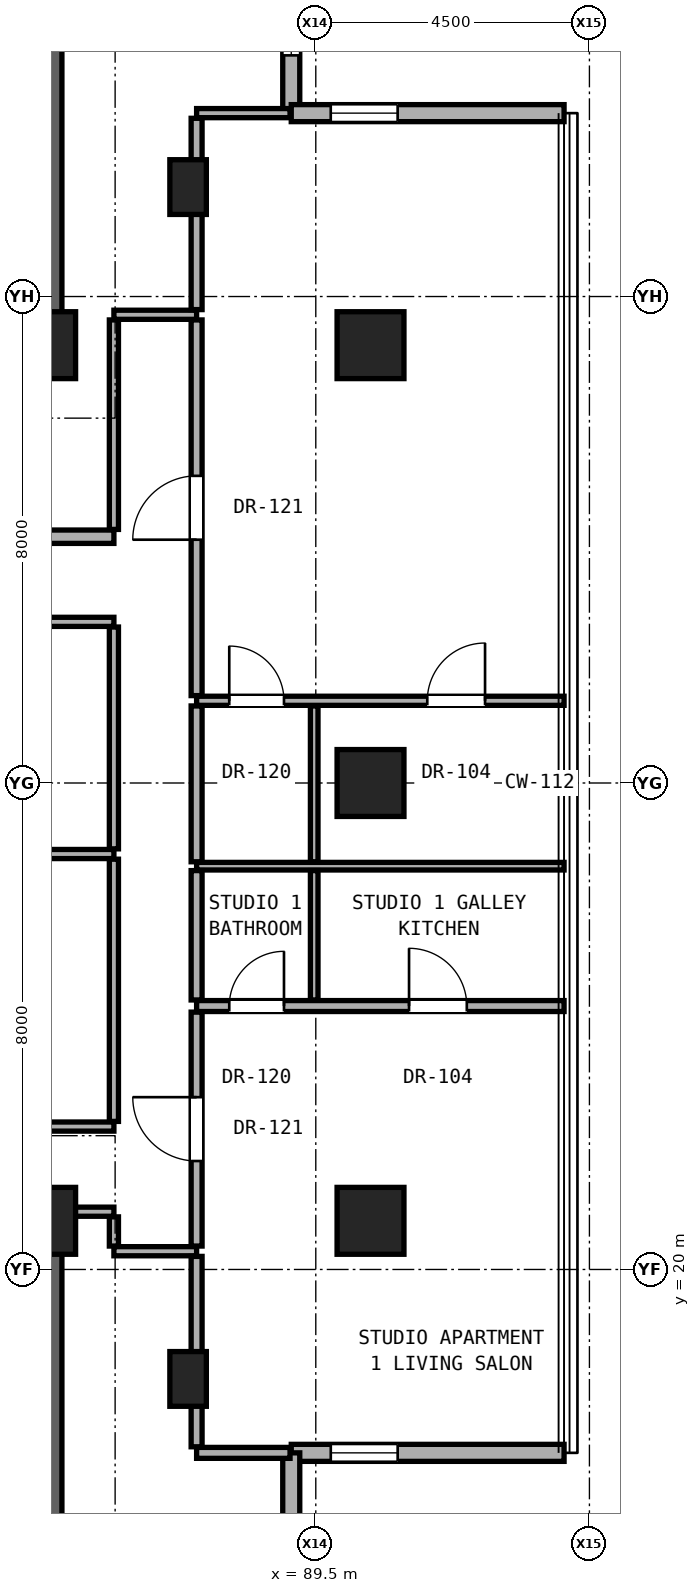
"""IFC4 building model, lengths in metres.
Left out: names, types, materials, properties, quantities, classifications, styles, units other than length and angle.
Written with IfcOpenShell. Run it as: python <this file> out.ifc"""

import sys

from ifc_helpers import new_model, si_unit, direction, frame, frame_2d, origin, origin_2d, place, context, subcontext, project, spatial, rectangle, hollow_rectangle, extrude, element, fill, save


model = new_model("IFC4")
c1 = context("Model", 3, precision=1e-05, world=origin(), true_north=direction((0.0, 1.0)))
c2 = subcontext(c1, "Body", "Model", "MODEL_VIEW")
j1 = project(units=[si_unit("LENGTHUNIT", "METRE"), si_unit("PLANEANGLEUNIT", "RADIAN")], contexts=[c1])
p1 = place(None, origin())
s1 = spatial("IfcSite", under=j1, at=p1, CompositionType="ELEMENT")
p2 = place(p1, origin())
s2 = spatial("IfcBuilding", under=s1, at=p2, CompositionType="ELEMENT")
p3 = place(p2, frame((0.0, 0.0, 121.4)))
s3 = spatial("IfcBuildingStorey", under=s2, at=p3, CompositionType="ELEMENT", Elevation=121.4)
for number, where, z_axis, x_axis in (
    (1, (85.0, 20.8, 0.0), (0.0, 0.0, 1.0), (1.0, 0.0, 0.0)),
    (2, (85.0, 35.2, 0.0), (0.0, 0.0, 1.0), (1.0, 0.0, 0.0)),
):
    element("IfcColumn", number, at=place(p3, frame(where, z_axis=z_axis, x_axis=x_axis)), inside=s3, PredefinedType="COLUMN", context=c2, shape_type="SweptSolid", body=[
        extrude(rectangle(XDim=1.1, YDim=1.1, at=origin_2d()), origin(), (0.0, 0.0, 1.0), 3.3),
    ])
for number, where, z_axis, x_axis in (
    (3, (90.4, 20.8, 0.0), (0.0, 0.0, 1.0), (1.0, 0.0, 0.0)),
    (4, (90.4, 28.0, 0.0), (0.0, 0.0, 1.0), (1.0, 0.0, 0.0)),
    (5, (90.4, 35.2, 0.0), (0.0, 0.0, 1.0), (1.0, 0.0, 0.0)),
):
    element("IfcColumn", number, at=place(p3, frame(where, z_axis=z_axis, x_axis=x_axis)), inside=s3, PredefinedType="COLUMN", context=c2, shape_type="SweptSolid", body=[
        extrude(hollow_rectangle(XDim=1.1, YDim=1.1, WallThickness=0.06, at=origin_2d()), origin(), (0.0, 0.0, 1.0), 3.3),
    ])
for number, where, z_axis, x_axis in (
    (6, (87.4, 18.2, 0.0), (0.0, 0.0, 1.0), (1.0, 0.0, 0.0)),
    (7, (87.4, 37.8, 0.0), (0.0, 0.0, 1.0), (1.0, 0.0, 0.0)),
):
    element("IfcColumn", number, at=place(p3, frame(where, z_axis=z_axis, x_axis=x_axis)), inside=s3, PredefinedType="PILASTER", context=c2, shape_type="SweptSolid", body=[
        extrude(rectangle(XDim=0.6, YDim=0.9, at=origin_2d()), origin(), (0.0, 0.0, 1.0), 3.3),
    ])
for number, where, z_axis, x_axis in (
    (8, (85.0, 35.2, 0.0), (0.0, 0.0, 1.0), (0.0, 1.0, 0.0)),
    (9, (85.0, 15.2, 0.0), (0.0, 0.0, 1.0), (0.0, 1.0, 0.0)),
):
    element("IfcWall", number, at=place(p3, frame(where, z_axis=z_axis, x_axis=x_axis)), inside=s3, PredefinedType="SHEAR", context=c2, shape_type="SweptSolid", body=[
        extrude(rectangle(XDim=5.6, YDim=0.65, at=frame_2d((2.8, 0.0))), origin(), (0.0, 0.0, 1.0), 3.08),
    ])
p4 = place(p3, frame((89.096, 39.016, 0.0), z_axis=(0.0, 0.0, 1.0), x_axis=(0.0, 1.0, 0.0)))
e10 = element("IfcWall", 10, at=p4, inside=s3, PredefinedType="SOLIDWALL", context=c2, shape_type="SweptSolid", body=[
    extrude(rectangle(XDim=4.486, YDim=0.28, at=frame_2d((2.243, 0.0))), origin(), (0.0, 0.0, 1.0), 3.06),
])
p5 = place(p4, frame((0.95, 0.0, 0.85)))
e11 = element("IfcOpeningElement", 11, at=p5, cuts=e10, PredefinedType="OPENING", context=c2, shape_type="SweptSolid", body=[
    extrude(rectangle(XDim=1.1, YDim=2.0, at=frame_2d((0.55, 1.0))), frame((0.0, 0.15, 0.0), z_axis=(0.0, -1.0, 0.0), x_axis=(1.0, 0.0, 0.0)), (0.0, 0.0, 1.0), 0.3),
])
p6 = place(p3, frame((89.096, 16.984, 0.0), z_axis=(0.0, 0.0, 1.0), x_axis=(1.0, 0.0, 0.0)))
e12 = element("IfcWall", 12, at=p6, inside=s3, PredefinedType="SOLIDWALL", context=c2, shape_type="SweptSolid", body=[
    extrude(rectangle(XDim=4.487, YDim=0.28, at=frame_2d((2.243, 0.0))), origin(), (0.0, 0.0, 1.0), 3.06),
])
p7 = place(p6, frame((0.65, 0.0, 0.85)))
e13 = element("IfcOpeningElement", 13, at=p7, cuts=e12, PredefinedType="OPENING", context=c2, shape_type="SweptSolid", body=[
    extrude(rectangle(XDim=1.1, YDim=2.0, at=frame_2d((0.55, 1.0))), frame((0.0, 0.15, 0.0), z_axis=(0.0, -1.0, 0.0), x_axis=(1.0, 0.0, 0.0)), (0.0, 0.0, 1.0), 0.3),
])
p8 = place(p3, frame((89.096, 12.498, 0.0), z_axis=(0.0, 0.0, 1.0), x_axis=(0.0, 1.0, 0.0)))
e14 = element("IfcWall", 14, at=p8, inside=s3, PredefinedType="SOLIDWALL", context=c2, shape_type="SweptSolid", body=[
    extrude(rectangle(XDim=4.486, YDim=0.28, at=frame_2d((2.243, 0.0))), origin(), (0.0, 0.0, 1.0), 3.06),
])
p9 = place(p3, frame((93.583, 39.016, 0.0), z_axis=(0.0, 0.0, 1.0), x_axis=(-1.0, 0.0, 0.0)))
e15 = element("IfcWall", 15, at=p9, inside=s3, PredefinedType="SOLIDWALL", context=c2, shape_type="SweptSolid", body=[
    extrude(rectangle(XDim=4.487, YDim=0.28, at=frame_2d((2.243, 0.0))), origin(), (0.0, 0.0, 1.0), 3.06),
])
p10 = place(p9, frame((2.737, 0.0, 0.85)))
e16 = element("IfcOpeningElement", 16, at=p10, cuts=e15, PredefinedType="OPENING", context=c2, shape_type="SweptSolid", body=[
    extrude(rectangle(XDim=1.1, YDim=2.0, at=frame_2d((0.55, 1.0))), frame((0.0, 0.15, 0.0), z_axis=(0.0, -1.0, 0.0), x_axis=(1.0, 0.0, 0.0)), (0.0, 0.0, 1.0), 0.3),
])
p11 = place(p3, frame((87.54, 16.984, 0.0), z_axis=(0.0, 0.0, 1.0), x_axis=(1.0, 0.0, 0.0)))
e17 = element("IfcWall", 17, at=p11, inside=s3, PredefinedType="PARTITIONING", context=c2, shape_type="SweptSolid", body=[
    extrude(rectangle(XDim=1.536, YDim=0.18, at=frame_2d((0.768, 0.0))), origin(), (0.0, 0.0, 1.0), 3.08),
])
p12 = place(p3, frame((86.18, 20.3, 0.0), z_axis=(0.0, 0.0, 1.0), x_axis=(1.0, 0.0, 0.0)))
e18 = element("IfcWall", 18, at=p12, inside=s3, PredefinedType="PARTITIONING", context=c2, shape_type="SweptSolid", body=[
    extrude(rectangle(XDim=1.36, YDim=0.15, at=frame_2d((0.68, 0.0))), origin(), (0.0, 0.0, 1.0), 3.08),
])
p13 = place(p3, frame((85.32, 20.95, 0.0), z_axis=(0.0, 0.0, 1.0), x_axis=(1.0, 0.0, 0.0)))
e19 = element("IfcWall", 19, at=p13, inside=s3, PredefinedType="PARTITIONING", context=c2, shape_type="SweptSolid", body=[
    extrude(rectangle(XDim=0.86, YDim=0.15, at=frame_2d((0.43, 0.0))), origin(), (0.0, 0.0, 1.0), 2.472),
])
p14 = place(p3, frame((66.68, 22.35, 0.0), z_axis=(0.0, 0.0, 1.0), x_axis=(1.0, 0.0, 0.0)))
e20 = element("IfcWall", 20, at=p14, inside=s3, PredefinedType="PARTITIONING", context=c2, shape_type="SweptSolid", body=[
    extrude(rectangle(XDim=19.5, YDim=0.15, at=frame_2d((9.75, 0.0))), origin(), (0.0, 0.0, 1.0), 2.216),
])
p15 = place(p14, frame((11.89, 0.0, 0.0)))
e21 = element("IfcOpeningElement", 21, at=p15, cuts=e20, PredefinedType="OPENING", context=c2, shape_type="SweptSolid", body=[
    extrude(rectangle(XDim=1.05, YDim=2.2, at=frame_2d((0.525, 1.1))), frame((0.0, 0.085, 0.0), z_axis=(0.0, -1.0, 0.0), x_axis=(1.0, 0.0, 0.0)), (0.0, 0.0, 1.0), 0.17),
])
p16 = place(p3, frame((87.54, 24.332, 0.0), z_axis=(0.0, 0.0, 1.0), x_axis=(1.0, 0.0, 0.0)))
e22 = element("IfcWall", 22, at=p16, inside=s3, PredefinedType="PARTITIONING", context=c2, shape_type="SweptSolid", body=[
    extrude(rectangle(XDim=6.043, YDim=0.18, at=frame_2d((3.021, 0.0))), origin(), (0.0, 0.0, 1.0), 2.299),
])
p17 = place(p16, frame((3.493, 0.0, 0.0)))
e23 = element("IfcOpeningElement", 23, at=p17, cuts=e22, PredefinedType="OPENING", context=c2, shape_type="SweptSolid", body=[
    extrude(rectangle(XDim=0.95, YDim=2.15, at=frame_2d((0.475, 1.075))), frame((0.0, 0.1, 0.0), z_axis=(0.0, -1.0, 0.0), x_axis=(1.0, 0.0, 0.0)), (0.0, 0.0, 1.0), 0.2),
])
p18 = place(p16, frame((0.537, 0.0, 0.0)))
e24 = element("IfcOpeningElement", 24, at=p18, cuts=e22, PredefinedType="OPENING", context=c2, shape_type="SweptSolid", body=[
    extrude(rectangle(XDim=0.9, YDim=2.1, at=frame_2d((0.45, 1.05))), frame((0.0, 0.1, 0.0), z_axis=(0.0, -1.0, 0.0), x_axis=(1.0, 0.0, 0.0)), (0.0, 0.0, 1.0), 0.2),
])
p19 = place(p3, frame((87.54, 26.632, 0.0), z_axis=(0.0, 0.0, 1.0), x_axis=(1.0, 0.0, 0.0)))
e25 = element("IfcWall", 25, at=p19, inside=s3, PredefinedType="PARTITIONING", context=c2, shape_type="SweptSolid", body=[
    extrude(rectangle(XDim=6.043, YDim=0.125, at=frame_2d((3.021, 0.0))), origin(), (0.0, 0.0, 1.0), 2.299),
])
p20 = place(p3, frame((72.05, 26.832, 0.0), z_axis=(0.0, 0.0, 1.0), x_axis=(1.0, 0.0, 0.0)))
e26 = element("IfcWall", 26, at=p20, inside=s3, PredefinedType="PARTITIONING", context=c2, shape_type="SweptSolid", body=[
    extrude(rectangle(XDim=14.13, YDim=0.15, at=frame_2d((7.065, 0.0))), origin(), (0.0, 0.0, 1.0), 2.216),
])
p21 = place(p3, frame((87.54, 29.352, 0.0), z_axis=(0.0, 0.0, 1.0), x_axis=(1.0, 0.0, 0.0)))
e27 = element("IfcWall", 27, at=p21, inside=s3, PredefinedType="PARTITIONING", context=c2, shape_type="SweptSolid", body=[
    extrude(rectangle(XDim=6.043, YDim=0.15, at=frame_2d((3.021, 0.0))), origin(), (0.0, 0.0, 1.0), 2.299),
])
p22 = place(p21, frame((3.793, 0.0, 0.0)))
e28 = element("IfcOpeningElement", 28, at=p22, cuts=e27, PredefinedType="OPENING", context=c2, shape_type="SweptSolid", body=[
    extrude(rectangle(XDim=0.95, YDim=2.15, at=frame_2d((0.475, 1.075))), frame((0.0, 0.085, 0.0), z_axis=(0.0, -1.0, 0.0), x_axis=(1.0, 0.0, 0.0)), (0.0, 0.0, 1.0), 0.17),
])
p23 = place(p21, frame((0.537, 0.0, 0.0)))
e29 = element("IfcOpeningElement", 29, at=p23, cuts=e27, PredefinedType="OPENING", context=c2, shape_type="SweptSolid", body=[
    extrude(rectangle(XDim=0.9, YDim=2.1, at=frame_2d((0.45, 1.05))), frame((0.0, 0.085, 0.0), z_axis=(0.0, -1.0, 0.0), x_axis=(1.0, 0.0, 0.0)), (0.0, 0.0, 1.0), 0.17),
])
p24 = place(p3, frame((66.68, 30.65, 0.0), z_axis=(0.0, 0.0, 1.0), x_axis=(1.0, 0.0, 0.0)))
e30 = element("IfcWall", 30, at=p24, inside=s3, PredefinedType="PARTITIONING", context=c2, shape_type="SweptSolid", body=[
    extrude(rectangle(XDim=19.5, YDim=0.15, at=frame_2d((9.75, 0.0))), origin(), (0.0, 0.0, 1.0), 2.216),
])
p25 = place(p24, frame((3.745, 0.0, 0.0)))
e31 = element("IfcOpeningElement", 31, at=p25, cuts=e30, PredefinedType="OPENING", context=c2, shape_type="SweptSolid", body=[
    extrude(rectangle(XDim=0.95, YDim=2.15, at=frame_2d((0.475, 1.075))), frame((0.0, 0.085, 0.0), z_axis=(0.0, -1.0, 0.0), x_axis=(1.0, 0.0, 0.0)), (0.0, 0.0, 1.0), 0.17),
])
p26 = place(p24, frame((11.89, 0.0, 0.0)))
e32 = element("IfcOpeningElement", 32, at=p26, cuts=e30, PredefinedType="OPENING", context=c2, shape_type="SweptSolid", body=[
    extrude(rectangle(XDim=1.05, YDim=2.2, at=frame_2d((0.525, 1.1))), frame((0.0, 0.085, 0.0), z_axis=(0.0, -1.0, 0.0), x_axis=(1.0, 0.0, 0.0)), (0.0, 0.0, 1.0), 0.17),
])
p27 = place(p3, frame((71.55, 32.05, 0.0), z_axis=(0.0, 0.0, 1.0), x_axis=(1.0, 0.0, 0.0)))
e33 = element("IfcWall", 33, at=p27, inside=s3, PredefinedType="SOLIDWALL", context=c2, shape_type="SweptSolid", body=[
    extrude(rectangle(XDim=14.63, YDim=0.22, at=frame_2d((7.315, 0.0))), origin(), (0.0, 0.0, 1.0), 2.216),
])
p28 = place(p27, frame((6.065, 0.0, 0.0)))
e34 = element("IfcOpeningElement", 34, at=p28, cuts=e33, PredefinedType="OPENING", context=c2, shape_type="SweptSolid", body=[
    extrude(rectangle(XDim=0.85, YDim=2.01, at=frame_2d((0.425, 1.005))), frame((0.0, 0.12, 0.0), z_axis=(0.0, -1.0, 0.0), x_axis=(1.0, 0.0, 0.0)), (0.0, 0.0, 1.0), 0.24),
])
p29 = place(p27, frame((10.535, 0.0, 0.0)))
e35 = element("IfcOpeningElement", 35, at=p29, cuts=e33, PredefinedType="OPENING", context=c2, shape_type="SweptSolid", body=[
    extrude(rectangle(XDim=0.95, YDim=2.15, at=frame_2d((0.475, 1.075))), frame((0.0, 0.12, 0.0), z_axis=(0.0, -1.0, 0.0), x_axis=(1.0, 0.0, 0.0)), (0.0, 0.0, 1.0), 0.24),
])
p30 = place(p27, frame((1.65, 0.0, 0.0)))
e36 = element("IfcOpeningElement", 36, at=p30, cuts=e33, PredefinedType="OPENING", context=c2, shape_type="SweptSolid", body=[
    extrude(rectangle(XDim=0.85, YDim=2.01, at=frame_2d((0.425, 1.005))), frame((0.0, 0.12, 0.0), z_axis=(0.0, -1.0, 0.0), x_axis=(1.0, 0.0, 0.0)), (0.0, 0.0, 1.0), 0.24),
])
p31 = place(p3, frame((86.18, 35.7, 0.0), z_axis=(0.0, 0.0, 1.0), x_axis=(1.0, 0.0, 0.0)))
e37 = element("IfcWall", 37, at=p31, inside=s3, PredefinedType="PARTITIONING", context=c2, shape_type="SweptSolid", body=[
    extrude(rectangle(XDim=1.36, YDim=0.15, at=frame_2d((0.68, 0.0))), origin(), (0.0, 0.0, 1.0), 3.08),
])
p32 = place(p3, frame((87.54, 39.016, 0.0), z_axis=(0.0, 0.0, 1.0), x_axis=(1.0, 0.0, 0.0)))
e38 = element("IfcWall", 38, at=p32, inside=s3, PredefinedType="PARTITIONING", context=c2, shape_type="SweptSolid", body=[
    extrude(rectangle(XDim=1.536, YDim=0.15, at=frame_2d((0.768, 0.0))), origin(), (0.0, 0.0, 1.0), 3.08),
])
p33 = place(p3, frame((86.18, 20.385, 0.0), z_axis=(0.0, 0.0, 1.0), x_axis=(0.0, 1.0, 0.0)))
e39 = element("IfcWall", 39, at=p33, inside=s3, PredefinedType="PARTITIONING", context=c2, shape_type="SweptSolid", body=[
    extrude(rectangle(XDim=0.48, YDim=0.15, at=frame_2d((0.24, 0.0))), origin(), (0.0, 0.0, 1.0), 2.472),
])
p34 = place(p3, frame((86.18, 22.435, 0.0), z_axis=(0.0, 0.0, 1.0), x_axis=(0.0, 1.0, 0.0)))
e40 = element("IfcWall", 40, at=p34, inside=s3, PredefinedType="PARTITIONING", context=c2, shape_type="SweptSolid", body=[
    extrude(rectangle(XDim=4.312, YDim=0.15, at=frame_2d((2.156, 0.0))), origin(), (0.0, 0.0, 1.0), 3.08),
])
p35 = place(p3, frame((86.18, 26.917, 0.0), z_axis=(0.0, 0.0, 1.0), x_axis=(0.0, 1.0, 0.0)))
e41 = element("IfcWall", 41, at=p35, inside=s3, PredefinedType="PARTITIONING", context=c2, shape_type="SweptSolid", body=[
    extrude(rectangle(XDim=3.648, YDim=0.15, at=frame_2d((1.824, 0.0))), origin(), (0.0, 0.0, 1.0), 2.376),
])
p36 = place(p3, frame((86.18, 32.17, 0.0), z_axis=(0.0, 0.0, 1.0), x_axis=(0.0, 1.0, 0.0)))
e42 = element("IfcWall", 42, at=p36, inside=s3, PredefinedType="PARTITIONING", context=c2, shape_type="SweptSolid", body=[
    extrude(rectangle(XDim=3.445, YDim=0.15, at=frame_2d((1.723, 0.0))), origin(), (0.0, 0.0, 1.0), 2.472),
])
p37 = place(p3, frame((87.54, 17.084, 0.0), z_axis=(0.0, 0.0, 1.0), x_axis=(0.0, 1.0, 0.0)))
e43 = element("IfcWall", 43, at=p37, inside=s3, PredefinedType="PARTITIONING", context=c2, shape_type="SweptSolid", body=[
    extrude(rectangle(XDim=3.131, YDim=0.18, at=frame_2d((1.565, 0.0))), origin(), (0.0, 0.0, 1.0), 2.523),
])
p38 = place(p3, frame((87.54, 20.385, 0.0), z_axis=(0.0, 0.0, 1.0), x_axis=(0.0, 1.0, 0.0)))
e44 = element("IfcWall", 44, at=p38, inside=s3, PredefinedType="PARTITIONING", context=c2, shape_type="SweptSolid", body=[
    extrude(rectangle(XDim=3.847, YDim=0.18, at=frame_2d((1.923, 0.0))), origin(), (0.0, 0.0, 1.0), 2.472),
])
p39 = place(p38, frame((1.398, 0.0, 0.0)))
e45 = element("IfcOpeningElement", 45, at=p39, cuts=e44, PredefinedType="OPENING", context=c2, shape_type="SweptSolid", body=[
    extrude(rectangle(XDim=1.05, YDim=2.2, at=frame_2d((0.525, 1.1))), frame((0.0, 0.1, 0.0), z_axis=(0.0, -1.0, 0.0), x_axis=(1.0, 0.0, 0.0)), (0.0, 0.0, 1.0), 0.2),
])
p40 = place(p3, frame((87.54, 24.432, 0.0), z_axis=(0.0, 0.0, 1.0), x_axis=(0.0, 1.0, 0.0)))
e46 = element("IfcWall", 46, at=p40, inside=s3, PredefinedType="PARTITIONING", context=c2, shape_type="SweptSolid", body=[
    extrude(rectangle(XDim=2.128, YDim=0.18, at=frame_2d((1.064, 0.0))), origin(), (0.0, 0.0, 1.0), 3.08),
])
p41 = place(p3, frame((87.54, 26.705, 0.0), z_axis=(0.0, 0.0, 1.0), x_axis=(0.0, 1.0, 0.0)))
e47 = element("IfcWall", 47, at=p41, inside=s3, PredefinedType="PARTITIONING", context=c2, shape_type="SweptSolid", body=[
    extrude(rectangle(XDim=2.562, YDim=0.18, at=frame_2d((1.281, 0.0))), origin(), (0.0, 0.0, 1.0), 2.376),
])
p42 = place(p3, frame((87.54, 29.437, 0.0), z_axis=(0.0, 0.0, 1.0), x_axis=(0.0, 1.0, 0.0)))
e48 = element("IfcWall", 48, at=p42, inside=s3, PredefinedType="PARTITIONING", context=c2, shape_type="SweptSolid", body=[
    extrude(rectangle(XDim=6.178, YDim=0.18, at=frame_2d((3.089, 0.0))), origin(), (0.0, 0.0, 1.0), 2.472),
])
p43 = place(p42, frame((2.564, 0.0, 0.0)))
e49 = element("IfcOpeningElement", 49, at=p43, cuts=e48, PredefinedType="OPENING", context=c2, shape_type="SweptSolid", body=[
    extrude(rectangle(XDim=1.05, YDim=2.2, at=frame_2d((0.525, 1.1))), frame((0.0, 0.1, 0.0), z_axis=(0.0, -1.0, 0.0), x_axis=(1.0, 0.0, 0.0)), (0.0, 0.0, 1.0), 0.2),
])
p44 = place(p3, frame((87.54, 35.785, 0.0), z_axis=(0.0, 0.0, 1.0), x_axis=(0.0, 1.0, 0.0)))
e50 = element("IfcWall", 50, at=p44, inside=s3, PredefinedType="PARTITIONING", context=c2, shape_type="SweptSolid", body=[
    extrude(rectangle(XDim=3.146, YDim=0.18, at=frame_2d((1.573, 0.0))), origin(), (0.0, 0.0, 1.0), 2.523),
])
p45 = place(p3, frame((89.474, 24.432, 0.0), z_axis=(0.0, 0.0, 1.0), x_axis=(0.0, 1.0, 0.0)))
e51 = element("IfcWall", 51, at=p45, inside=s3, PredefinedType="PARTITIONING", context=c2, shape_type="SweptSolid", body=[
    extrude(rectangle(XDim=2.128, YDim=0.125, at=frame_2d((1.064, 0.0))), origin(), (0.0, 0.0, 1.0), 3.08),
])
p46 = place(p3, frame((89.474, 26.705, 0.0), z_axis=(0.0, 0.0, 1.0), x_axis=(0.0, 1.0, 0.0)))
e52 = element("IfcWall", 52, at=p46, inside=s3, PredefinedType="PARTITIONING", context=c2, shape_type="SweptSolid", body=[
    extrude(rectangle(XDim=2.562, YDim=0.125, at=frame_2d((1.281, 0.0))), origin(), (0.0, 0.0, 1.0), 2.376),
])
p47 = place(p5, origin())
e53 = element("IfcWindow", 53, at=p47, inside=s3, PartitioningType="SINGLE_PANEL", PredefinedType="WINDOW", context=c2, shape_type="SweptSolid", body=[
    extrude(rectangle(XDim=1.1, YDim=2.0, at=frame_2d((0.55, 1.0))), frame((0.0, 0.03, 0.0), z_axis=(0.0, -1.0, 0.0), x_axis=(1.0, 0.0, 0.0)), (0.0, 0.0, 1.0), 0.06),
])
fill(e11, e53)
p48 = place(p7, origin())
e54 = element("IfcWindow", 54, at=p48, inside=s3, PartitioningType="SINGLE_PANEL", PredefinedType="WINDOW", context=c2, shape_type="SweptSolid", body=[
    extrude(rectangle(XDim=1.1, YDim=2.0, at=frame_2d((0.55, 1.0))), frame((0.0, 0.03, 0.0), z_axis=(0.0, -1.0, 0.0), x_axis=(1.0, 0.0, 0.0)), (0.0, 0.0, 1.0), 0.06),
])
fill(e13, e54)
p49 = place(p10, origin())
e55 = element("IfcWindow", 55, at=p49, inside=s3, PartitioningType="SINGLE_PANEL", PredefinedType="WINDOW", context=c2, shape_type="SweptSolid", body=[
    extrude(rectangle(XDim=1.1, YDim=2.0, at=frame_2d((0.55, 1.0))), frame((0.0, 0.03, 0.0), z_axis=(0.0, -1.0, 0.0), x_axis=(1.0, 0.0, 0.0)), (0.0, 0.0, 1.0), 0.06),
])
fill(e16, e55)
p50 = place(p39, origin())
e56 = element("IfcDoor", 56, at=p50, inside=s3, OperationType="SINGLE_SWING_RIGHT", PredefinedType="DOOR", context=c2, shape_type="SweptSolid", body=[
    extrude(rectangle(XDim=1.05, YDim=2.2, at=frame_2d((0.525, 1.1))), frame((0.0, 0.025, 0.0), z_axis=(0.0, -1.0, 0.0), x_axis=(1.0, 0.0, 0.0)), (0.0, 0.0, 1.0), 0.05),
])
fill(e45, e56)
p51 = place(p17, origin())
e57 = element("IfcDoor", 57, at=p51, inside=s3, OperationType="SINGLE_SWING_LEFT", PredefinedType="DOOR", context=c2, shape_type="SweptSolid", body=[
    extrude(rectangle(XDim=0.95, YDim=2.15, at=frame_2d((0.475, 1.075))), frame((0.0, 0.025, 0.0), z_axis=(0.0, -1.0, 0.0), x_axis=(1.0, 0.0, 0.0)), (0.0, 0.0, 1.0), 0.05),
])
fill(e23, e57)
p52 = place(p18, origin())
e58 = element("IfcDoor", 58, at=p52, inside=s3, OperationType="SINGLE_SWING_RIGHT", PredefinedType="DOOR", context=c2, shape_type="SweptSolid", body=[
    extrude(rectangle(XDim=0.9, YDim=2.1, at=frame_2d((0.45, 1.05))), frame((0.0, 0.025, 0.0), z_axis=(0.0, -1.0, 0.0), x_axis=(1.0, 0.0, 0.0)), (0.0, 0.0, 1.0), 0.05),
])
fill(e24, e58)
p53 = place(p43, origin())
e59 = element("IfcDoor", 59, at=p53, inside=s3, OperationType="SINGLE_SWING_LEFT", PredefinedType="DOOR", context=c2, shape_type="SweptSolid", body=[
    extrude(rectangle(XDim=1.05, YDim=2.2, at=frame_2d((0.525, 1.1))), frame((0.0, 0.025, 0.0), z_axis=(0.0, -1.0, 0.0), x_axis=(1.0, 0.0, 0.0)), (0.0, 0.0, 1.0), 0.05),
])
fill(e49, e59)
p54 = place(p22, origin())
e60 = element("IfcDoor", 60, at=p54, inside=s3, OperationType="SINGLE_SWING_RIGHT", PredefinedType="DOOR", context=c2, shape_type="SweptSolid", body=[
    extrude(rectangle(XDim=0.95, YDim=2.15, at=frame_2d((0.475, 1.075))), frame((0.0, 0.025, 0.0), z_axis=(0.0, -1.0, 0.0), x_axis=(1.0, 0.0, 0.0)), (0.0, 0.0, 1.0), 0.05),
])
fill(e28, e60)
p55 = place(p23, origin())
e61 = element("IfcDoor", 61, at=p55, inside=s3, OperationType="SINGLE_SWING_LEFT", PredefinedType="DOOR", context=c2, shape_type="SweptSolid", body=[
    extrude(rectangle(XDim=0.9, YDim=2.1, at=frame_2d((0.45, 1.05))), frame((0.0, 0.025, 0.0), z_axis=(0.0, -1.0, 0.0), x_axis=(1.0, 0.0, 0.0)), (0.0, 0.0, 1.0), 0.05),
])
fill(e29, e61)
save(model, sys.argv[1])
